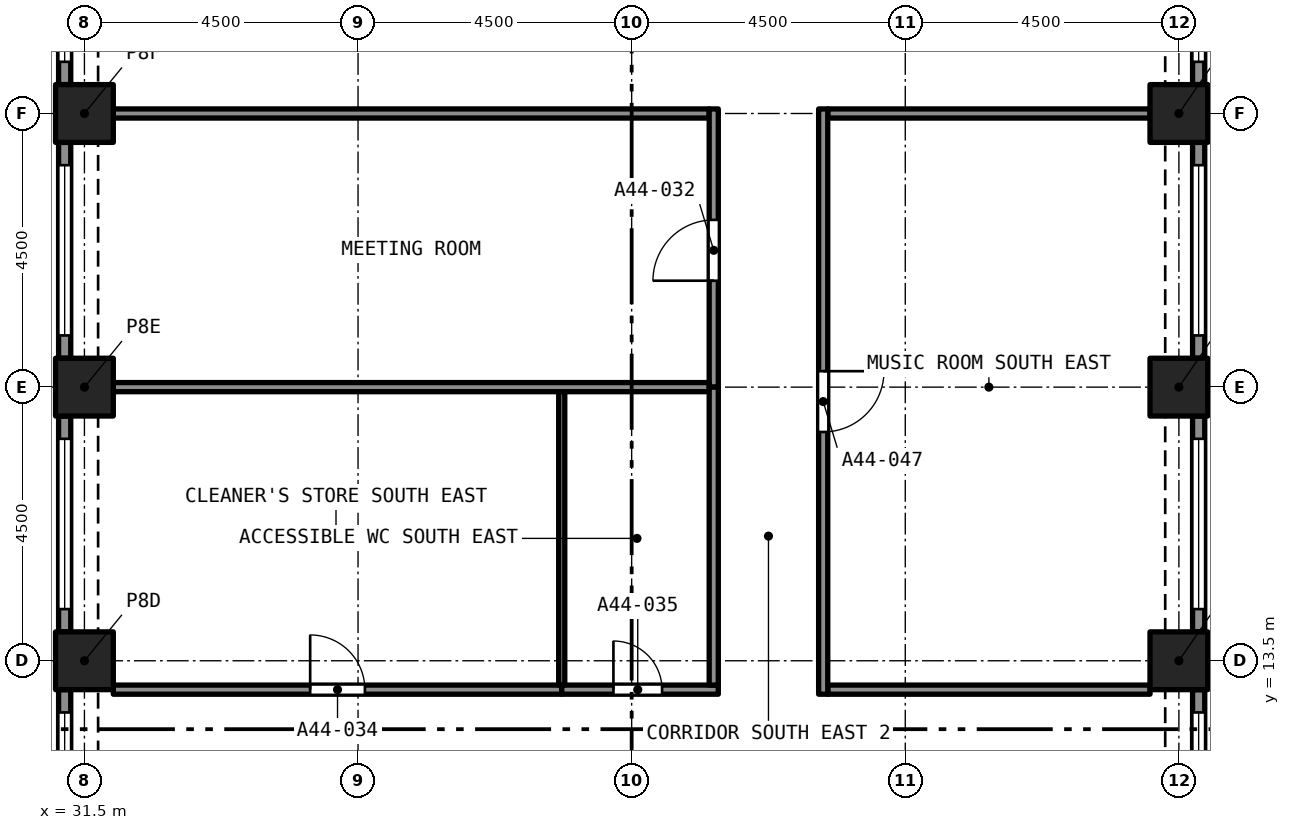
"""IFC4 building model, lengths in metres.
Left out: names, types, materials, properties, quantities, classifications, styles, units other than length and angle.
Written with IfcOpenShell. Run it as: python <this file> out.ifc"""

import sys

from ifc_helpers import new_model, si_unit, direction, frame, frame_2d, origin, origin_2d, place, context, subcontext, project, spatial, rectangle, extrude, element, fill, save


model = new_model("IFC4")
c1 = context("Model", 3, precision=1e-05, world=origin(), true_north=direction((0.0, 1.0)))
c2 = subcontext(c1, "Body", "Model", "MODEL_VIEW")
j1 = project(units=[si_unit("LENGTHUNIT", "METRE"), si_unit("PLANEANGLEUNIT", "RADIAN")], contexts=[c1])
p1 = place(None, origin())
s1 = spatial("IfcSite", under=j1, at=p1, CompositionType="ELEMENT")
p2 = place(p1, origin())
s2 = spatial("IfcBuilding", under=s1, at=p2, CompositionType="ELEMENT")
p3 = place(p2, frame((0.0, 0.0, 159.4)))
s3 = spatial("IfcBuildingStorey", under=s2, at=p3, CompositionType="ELEMENT", Elevation=159.4)
for number, where, z_axis, x_axis in (
    (1, (31.5, 13.5, 0.0), (0.0, 0.0, 1.0), (1.0, 0.0, 0.0)),
    (2, (49.5, 13.5, 0.0), (0.0, 0.0, 1.0), (1.0, 0.0, 0.0)),
    (3, (31.5, 18.0, 0.0), (0.0, 0.0, 1.0), (1.0, 0.0, 0.0)),
    (4, (49.5, 18.0, 0.0), (0.0, 0.0, 1.0), (1.0, 0.0, 0.0)),
    (5, (31.5, 22.5, 0.0), (0.0, 0.0, 1.0), (1.0, 0.0, 0.0)),
    (6, (49.5, 22.5, 0.0), (0.0, 0.0, 1.0), (1.0, 0.0, 0.0)),
):
    element("IfcColumn", number, at=place(p3, frame(where, z_axis=z_axis, x_axis=x_axis)), inside=s3, PredefinedType="COLUMN", context=c2, shape_type="SweptSolid", body=[
        extrude(rectangle(XDim=0.95, YDim=0.95, at=origin_2d()), origin(), (0.0, 0.0, 1.0), 4.4),
    ])
p4 = place(p3, frame((49.825, 13.025, 0.0), z_axis=(0.0, 0.0, 1.0), x_axis=(0.0, -1.0, 0.0)))
e7 = element("IfcWall", 7, at=p4, inside=s3, PredefinedType="SOLIDWALL", context=c2, shape_type="SweptSolid", body=[
    extrude(rectangle(XDim=3.55, YDim=0.2, at=frame_2d((1.775, 0.0))), origin(), (0.0, 0.0, 1.0), 4.4),
])
p5 = place(p4, frame((0.375, 0.0, 0.45)))
e8 = element("IfcOpeningElement", 8, at=p5, cuts=e7, PredefinedType="OPENING", context=c2, shape_type="SweptSolid", body=[
    extrude(rectangle(XDim=2.8, YDim=2.55, at=frame_2d((1.4, 1.275))), frame((0.0, 0.11, 0.0), z_axis=(0.0, -1.0, 0.0), x_axis=(1.0, 0.0, 0.0)), (0.0, 0.0, 1.0), 0.22),
])
p6 = place(p3, frame((49.825, 17.525, 0.0), z_axis=(0.0, 0.0, 1.0), x_axis=(0.0, -1.0, 0.0)))
e9 = element("IfcWall", 9, at=p6, inside=s3, PredefinedType="SOLIDWALL", context=c2, shape_type="SweptSolid", body=[
    extrude(rectangle(XDim=3.55, YDim=0.2, at=frame_2d((1.775, 0.0))), origin(), (0.0, 0.0, 1.0), 4.4),
])
p7 = place(p6, frame((0.375, 0.0, 0.45)))
e10 = element("IfcOpeningElement", 10, at=p7, cuts=e9, PredefinedType="OPENING", context=c2, shape_type="SweptSolid", body=[
    extrude(rectangle(XDim=2.8, YDim=2.55, at=frame_2d((1.4, 1.275))), frame((0.0, 0.11, 0.0), z_axis=(0.0, -1.0, 0.0), x_axis=(1.0, 0.0, 0.0)), (0.0, 0.0, 1.0), 0.22),
])
p8 = place(p3, frame((49.825, 22.025, 0.0), z_axis=(0.0, 0.0, 1.0), x_axis=(0.0, -1.0, 0.0)))
e11 = element("IfcWall", 11, at=p8, inside=s3, PredefinedType="SOLIDWALL", context=c2, shape_type="SweptSolid", body=[
    extrude(rectangle(XDim=3.55, YDim=0.2, at=frame_2d((1.775, 0.0))), origin(), (0.0, 0.0, 1.0), 4.4),
])
p9 = place(p8, frame((0.375, 0.0, 0.45)))
e12 = element("IfcOpeningElement", 12, at=p9, cuts=e11, PredefinedType="OPENING", context=c2, shape_type="SweptSolid", body=[
    extrude(rectangle(XDim=2.8, YDim=2.55, at=frame_2d((1.4, 1.275))), frame((0.0, 0.11, 0.0), z_axis=(0.0, -1.0, 0.0), x_axis=(1.0, 0.0, 0.0)), (0.0, 0.0, 1.0), 0.22),
])
p10 = place(p3, frame((49.825, 26.525, 0.0), z_axis=(0.0, 0.0, 1.0), x_axis=(0.0, -1.0, 0.0)))
e13 = element("IfcWall", 13, at=p10, inside=s3, PredefinedType="SOLIDWALL", context=c2, shape_type="SweptSolid", body=[
    extrude(rectangle(XDim=3.55, YDim=0.2, at=frame_2d((1.775, 0.0))), origin(), (0.0, 0.0, 1.0), 4.4),
])
p11 = place(p10, frame((0.375, 0.0, 0.45)))
e14 = element("IfcOpeningElement", 14, at=p11, cuts=e13, PredefinedType="OPENING", context=c2, shape_type="SweptSolid", body=[
    extrude(rectangle(XDim=2.8, YDim=2.55, at=frame_2d((1.4, 1.275))), frame((0.0, 0.11, 0.0), z_axis=(0.0, -1.0, 0.0), x_axis=(1.0, 0.0, 0.0)), (0.0, 0.0, 1.0), 0.22),
])
p12 = place(p3, frame((31.175, 22.975, 0.0), z_axis=(0.0, 0.0, 1.0), x_axis=(0.0, 1.0, 0.0)))
e15 = element("IfcWall", 15, at=p12, inside=s3, PredefinedType="SOLIDWALL", context=c2, shape_type="SweptSolid", body=[
    extrude(rectangle(XDim=3.55, YDim=0.2, at=frame_2d((1.775, 0.0))), origin(), (0.0, 0.0, 1.0), 4.4),
])
p13 = place(p12, frame((0.375, 0.0, 0.45)))
e16 = element("IfcOpeningElement", 16, at=p13, cuts=e15, PredefinedType="OPENING", context=c2, shape_type="SweptSolid", body=[
    extrude(rectangle(XDim=2.8, YDim=2.55, at=frame_2d((1.4, 1.275))), frame((0.0, 0.11, 0.0), z_axis=(0.0, -1.0, 0.0), x_axis=(1.0, 0.0, 0.0)), (0.0, 0.0, 1.0), 0.22),
])
p14 = place(p3, frame((31.175, 18.475, 0.0), z_axis=(0.0, 0.0, 1.0), x_axis=(0.0, 1.0, 0.0)))
e17 = element("IfcWall", 17, at=p14, inside=s3, PredefinedType="SOLIDWALL", context=c2, shape_type="SweptSolid", body=[
    extrude(rectangle(XDim=3.55, YDim=0.2, at=frame_2d((1.775, 0.0))), origin(), (0.0, 0.0, 1.0), 4.4),
])
p15 = place(p14, frame((0.375, 0.0, 0.45)))
e18 = element("IfcOpeningElement", 18, at=p15, cuts=e17, PredefinedType="OPENING", context=c2, shape_type="SweptSolid", body=[
    extrude(rectangle(XDim=2.8, YDim=2.55, at=frame_2d((1.4, 1.275))), frame((0.0, 0.11, 0.0), z_axis=(0.0, -1.0, 0.0), x_axis=(1.0, 0.0, 0.0)), (0.0, 0.0, 1.0), 0.22),
])
p16 = place(p3, frame((31.175, 13.975, 0.0), z_axis=(0.0, 0.0, 1.0), x_axis=(0.0, 1.0, 0.0)))
e19 = element("IfcWall", 19, at=p16, inside=s3, PredefinedType="SOLIDWALL", context=c2, shape_type="SweptSolid", body=[
    extrude(rectangle(XDim=3.55, YDim=0.2, at=frame_2d((1.775, 0.0))), origin(), (0.0, 0.0, 1.0), 4.4),
])
p17 = place(p16, frame((0.375, 0.0, 0.45)))
e20 = element("IfcOpeningElement", 20, at=p17, cuts=e19, PredefinedType="OPENING", context=c2, shape_type="SweptSolid", body=[
    extrude(rectangle(XDim=2.8, YDim=2.55, at=frame_2d((1.4, 1.275))), frame((0.0, 0.11, 0.0), z_axis=(0.0, -1.0, 0.0), x_axis=(1.0, 0.0, 0.0)), (0.0, 0.0, 1.0), 0.22),
])
p18 = place(p3, frame((31.175, 9.475, 0.0), z_axis=(0.0, 0.0, 1.0), x_axis=(0.0, 1.0, 0.0)))
e21 = element("IfcWall", 21, at=p18, inside=s3, PredefinedType="SOLIDWALL", context=c2, shape_type="SweptSolid", body=[
    extrude(rectangle(XDim=3.55, YDim=0.2, at=frame_2d((1.775, 0.0))), origin(), (0.0, 0.0, 1.0), 4.4),
])
p19 = place(p18, frame((0.375, 0.0, 0.45)))
e22 = element("IfcOpeningElement", 22, at=p19, cuts=e21, PredefinedType="OPENING", context=c2, shape_type="SweptSolid", body=[
    extrude(rectangle(XDim=2.8, YDim=2.55, at=frame_2d((1.4, 1.275))), frame((0.0, 0.11, 0.0), z_axis=(0.0, -1.0, 0.0), x_axis=(1.0, 0.0, 0.0)), (0.0, 0.0, 1.0), 0.22),
])
p20 = place(p3, frame((31.975, 22.5, 0.0), z_axis=(0.0, 0.0, 1.0), x_axis=(1.0, 0.0, 0.0)))
e23 = element("IfcWall", 23, at=p20, inside=s3, PredefinedType="PARTITIONING", context=c2, shape_type="SweptSolid", body=[
    extrude(rectangle(XDim=9.8, YDim=0.15, at=frame_2d((4.9, 0.0))), origin(), (0.0, 0.0, 1.0), 4.1),
])
p21 = place(p3, frame((41.85, 18.0, 0.0), z_axis=(0.0, 0.0, 1.0), x_axis=(0.0, 1.0, 0.0)))
e24 = element("IfcWall", 24, at=p21, inside=s3, PredefinedType="PARTITIONING", context=c2, shape_type="SweptSolid", body=[
    extrude(rectangle(XDim=4.575, YDim=0.15, at=frame_2d((2.288, 0.0))), origin(), (0.0, 0.0, 1.0), 4.1),
])
p22 = place(p21, frame((1.75, 0.0, 0.0)))
e25 = element("IfcOpeningElement", 25, at=p22, cuts=e24, PredefinedType="OPENING", context=c2, shape_type="SweptSolid", body=[
    extrude(rectangle(XDim=1.0, YDim=2.1, at=frame_2d((0.5, 1.05))), frame((0.0, 0.085, 0.0), z_axis=(0.0, -1.0, 0.0), x_axis=(1.0, 0.0, 0.0)), (0.0, 0.0, 1.0), 0.17),
])
p23 = place(p3, frame((31.975, 18.0, 0.0), z_axis=(0.0, 0.0, 1.0), x_axis=(1.0, 0.0, 0.0)))
e26 = element("IfcWall", 26, at=p23, inside=s3, PredefinedType="PARTITIONING", context=c2, shape_type="SweptSolid", body=[
    extrude(rectangle(XDim=9.8, YDim=0.15, at=frame_2d((4.9, 0.0))), origin(), (0.0, 0.0, 1.0), 4.1),
])
p24 = place(p3, frame((31.975, 13.025, 0.0), z_axis=(0.0, 0.0, 1.0), x_axis=(1.0, 0.0, 0.0)))
e27 = element("IfcWall", 27, at=p24, inside=s3, PredefinedType="PARTITIONING", context=c2, shape_type="SweptSolid", body=[
    extrude(rectangle(XDim=7.375, YDim=0.15, at=frame_2d((3.688, 0.0))), origin(), (0.0, 0.0, 1.0), 4.1),
])
p25 = place(p24, frame((3.238, 0.0, 0.0)))
e28 = element("IfcOpeningElement", 28, at=p25, cuts=e27, PredefinedType="OPENING", context=c2, shape_type="SweptSolid", body=[
    extrude(rectangle(XDim=0.9, YDim=2.1, at=frame_2d((0.45, 1.05))), frame((0.0, 0.085, 0.0), z_axis=(0.0, -1.0, 0.0), x_axis=(1.0, 0.0, 0.0)), (0.0, 0.0, 1.0), 0.17),
])
p26 = place(p3, frame((39.35, 13.025, 0.0), z_axis=(0.0, 0.0, 1.0), x_axis=(1.0, 0.0, 0.0)))
e29 = element("IfcWall", 29, at=p26, inside=s3, PredefinedType="PARTITIONING", context=c2, shape_type="SweptSolid", body=[
    extrude(rectangle(XDim=2.575, YDim=0.15, at=frame_2d((1.288, 0.0))), origin(), (0.0, 0.0, 1.0), 4.1),
])
p27 = place(p26, frame((0.85, 0.0, 0.0)))
e30 = element("IfcOpeningElement", 30, at=p27, cuts=e29, PredefinedType="OPENING", context=c2, shape_type="SweptSolid", body=[
    extrude(rectangle(XDim=0.8, YDim=2.1, at=frame_2d((0.4, 1.05))), frame((0.0, 0.085, 0.0), z_axis=(0.0, -1.0, 0.0), x_axis=(1.0, 0.0, 0.0)), (0.0, 0.0, 1.0), 0.17),
])
for number, where, z_axis, x_axis in (
    (31, (43.725, 13.025, 0.0), (0.0, 0.0, 1.0), (1.0, 0.0, 0.0)),
    (32, (43.725, 22.5, 0.0), (0.0, 0.0, 1.0), (1.0, 0.0, 0.0)),
):
    element("IfcWall", number, at=place(p3, frame(where, z_axis=z_axis, x_axis=x_axis)), inside=s3, PredefinedType="PARTITIONING", context=c2, shape_type="SweptSolid", body=[
        extrude(rectangle(XDim=5.3, YDim=0.15, at=frame_2d((2.65, 0.0))), origin(), (0.0, 0.0, 1.0), 4.1),
    ])
p28 = place(p3, frame((41.85, 13.1, 0.0), z_axis=(0.0, 0.0, 1.0), x_axis=(0.0, 1.0, 0.0)))
e33 = element("IfcWall", 33, at=p28, inside=s3, PredefinedType="PARTITIONING", context=c2, shape_type="SweptSolid", body=[
    extrude(rectangle(XDim=4.9, YDim=0.15, at=frame_2d((2.45, 0.0))), origin(), (0.0, 0.0, 1.0), 4.1),
])
p29 = place(p3, frame((43.65, 22.575, 0.0), z_axis=(0.0, 0.0, 1.0), x_axis=(0.0, -1.0, 0.0)))
e34 = element("IfcWall", 34, at=p29, inside=s3, PredefinedType="PARTITIONING", context=c2, shape_type="SweptSolid", body=[
    extrude(rectangle(XDim=9.625, YDim=0.15, at=frame_2d((4.812, 0.0))), origin(), (0.0, 0.0, 1.0), 4.1),
])
p30 = place(p29, frame((4.312, 0.0, 0.0)))
e35 = element("IfcOpeningElement", 35, at=p30, cuts=e34, PredefinedType="OPENING", context=c2, shape_type="SweptSolid", body=[
    extrude(rectangle(XDim=1.0, YDim=2.1, at=frame_2d((0.5, 1.05))), frame((0.0, 0.085, 0.0), z_axis=(0.0, -1.0, 0.0), x_axis=(1.0, 0.0, 0.0)), (0.0, 0.0, 1.0), 0.17),
])
p31 = place(p3, frame((39.35, 13.1, 0.0), z_axis=(0.0, 0.0, 1.0), x_axis=(0.0, 1.0, 0.0)))
e36 = element("IfcWall", 36, at=p31, inside=s3, PredefinedType="PARTITIONING", context=c2, shape_type="SweptSolid", body=[
    extrude(rectangle(XDim=4.825, YDim=0.1, at=frame_2d((2.413, 0.0))), origin(), (0.0, 0.0, 1.0), 4.1),
])
p32 = place(p5, origin())
e37 = element("IfcWindow", 37, at=p32, inside=s3, PartitioningType="SINGLE_PANEL", PredefinedType="WINDOW", context=c2, shape_type="SweptSolid", body=[
    extrude(rectangle(XDim=2.8, YDim=2.55, at=frame_2d((1.4, 1.275))), frame((0.0, 0.03, 0.0), z_axis=(0.0, -1.0, 0.0), x_axis=(1.0, 0.0, 0.0)), (0.0, 0.0, 1.0), 0.06),
])
fill(e8, e37)
p33 = place(p7, origin())
e38 = element("IfcWindow", 38, at=p33, inside=s3, PartitioningType="SINGLE_PANEL", PredefinedType="WINDOW", context=c2, shape_type="SweptSolid", body=[
    extrude(rectangle(XDim=2.8, YDim=2.55, at=frame_2d((1.4, 1.275))), frame((0.0, 0.03, 0.0), z_axis=(0.0, -1.0, 0.0), x_axis=(1.0, 0.0, 0.0)), (0.0, 0.0, 1.0), 0.06),
])
fill(e10, e38)
p34 = place(p9, origin())
e39 = element("IfcWindow", 39, at=p34, inside=s3, PartitioningType="SINGLE_PANEL", PredefinedType="WINDOW", context=c2, shape_type="SweptSolid", body=[
    extrude(rectangle(XDim=2.8, YDim=2.55, at=frame_2d((1.4, 1.275))), frame((0.0, 0.03, 0.0), z_axis=(0.0, -1.0, 0.0), x_axis=(1.0, 0.0, 0.0)), (0.0, 0.0, 1.0), 0.06),
])
fill(e12, e39)
p35 = place(p11, origin())
e40 = element("IfcWindow", 40, at=p35, inside=s3, PartitioningType="SINGLE_PANEL", PredefinedType="WINDOW", context=c2, shape_type="SweptSolid", body=[
    extrude(rectangle(XDim=2.8, YDim=2.55, at=frame_2d((1.4, 1.275))), frame((0.0, 0.03, 0.0), z_axis=(0.0, -1.0, 0.0), x_axis=(1.0, 0.0, 0.0)), (0.0, 0.0, 1.0), 0.06),
])
fill(e14, e40)
p36 = place(p13, origin())
e41 = element("IfcWindow", 41, at=p36, inside=s3, PartitioningType="SINGLE_PANEL", PredefinedType="WINDOW", context=c2, shape_type="SweptSolid", body=[
    extrude(rectangle(XDim=2.8, YDim=2.55, at=frame_2d((1.4, 1.275))), frame((0.0, 0.03, 0.0), z_axis=(0.0, -1.0, 0.0), x_axis=(1.0, 0.0, 0.0)), (0.0, 0.0, 1.0), 0.06),
])
fill(e16, e41)
p37 = place(p15, origin())
e42 = element("IfcWindow", 42, at=p37, inside=s3, PartitioningType="SINGLE_PANEL", PredefinedType="WINDOW", context=c2, shape_type="SweptSolid", body=[
    extrude(rectangle(XDim=2.8, YDim=2.55, at=frame_2d((1.4, 1.275))), frame((0.0, 0.03, 0.0), z_axis=(0.0, -1.0, 0.0), x_axis=(1.0, 0.0, 0.0)), (0.0, 0.0, 1.0), 0.06),
])
fill(e18, e42)
p38 = place(p17, origin())
e43 = element("IfcWindow", 43, at=p38, inside=s3, PartitioningType="SINGLE_PANEL", PredefinedType="WINDOW", context=c2, shape_type="SweptSolid", body=[
    extrude(rectangle(XDim=2.8, YDim=2.55, at=frame_2d((1.4, 1.275))), frame((0.0, 0.03, 0.0), z_axis=(0.0, -1.0, 0.0), x_axis=(1.0, 0.0, 0.0)), (0.0, 0.0, 1.0), 0.06),
])
fill(e20, e43)
p39 = place(p19, origin())
e44 = element("IfcWindow", 44, at=p39, inside=s3, PartitioningType="SINGLE_PANEL", PredefinedType="WINDOW", context=c2, shape_type="SweptSolid", body=[
    extrude(rectangle(XDim=2.8, YDim=2.55, at=frame_2d((1.4, 1.275))), frame((0.0, 0.03, 0.0), z_axis=(0.0, -1.0, 0.0), x_axis=(1.0, 0.0, 0.0)), (0.0, 0.0, 1.0), 0.06),
])
fill(e22, e44)
p40 = place(p22, origin())
e45 = element("IfcDoor", 45, at=p40, inside=s3, OperationType="SINGLE_SWING_LEFT", PredefinedType="DOOR", context=c2, shape_type="SweptSolid", body=[
    extrude(rectangle(XDim=1.0, YDim=2.1, at=frame_2d((0.5, 1.05))), frame((0.0, 0.025, 0.0), z_axis=(0.0, -1.0, 0.0), x_axis=(1.0, 0.0, 0.0)), (0.0, 0.0, 1.0), 0.05),
])
fill(e25, e45)
p41 = place(p25, origin())
e46 = element("IfcDoor", 46, at=p41, inside=s3, OperationType="SINGLE_SWING_LEFT", PredefinedType="DOOR", context=c2, shape_type="SweptSolid", body=[
    extrude(rectangle(XDim=0.9, YDim=2.1, at=frame_2d((0.45, 1.05))), frame((0.0, 0.025, 0.0), z_axis=(0.0, -1.0, 0.0), x_axis=(1.0, 0.0, 0.0)), (0.0, 0.0, 1.0), 0.05),
])
fill(e28, e46)
p42 = place(p27, origin())
e47 = element("IfcDoor", 47, at=p42, inside=s3, OperationType="SINGLE_SWING_LEFT", PredefinedType="DOOR", context=c2, shape_type="SweptSolid", body=[
    extrude(rectangle(XDim=0.8, YDim=2.1, at=frame_2d((0.4, 1.05))), frame((0.0, 0.025, 0.0), z_axis=(0.0, -1.0, 0.0), x_axis=(1.0, 0.0, 0.0)), (0.0, 0.0, 1.0), 0.05),
])
fill(e30, e47)
p43 = place(p30, origin())
e48 = element("IfcDoor", 48, at=p43, inside=s3, OperationType="SINGLE_SWING_RIGHT", PredefinedType="DOOR", context=c2, shape_type="SweptSolid", body=[
    extrude(rectangle(XDim=1.0, YDim=2.1, at=frame_2d((0.5, 1.05))), frame((0.0, 0.025, 0.0), z_axis=(0.0, -1.0, 0.0), x_axis=(1.0, 0.0, 0.0)), (0.0, 0.0, 1.0), 0.05),
])
fill(e35, e48)
save(model, sys.argv[1])
